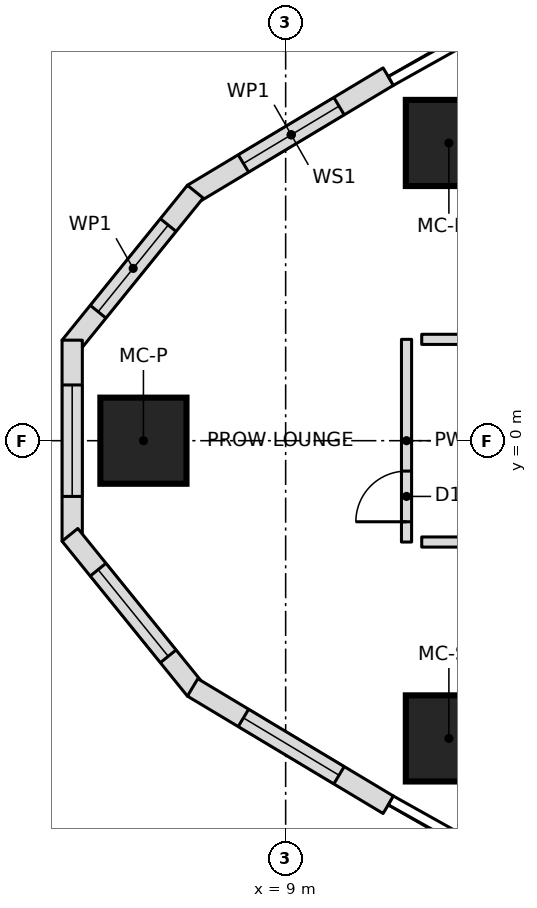
"""IFC4 building model, lengths in metres.
Left out: names, types, materials, properties, quantities, classifications, styles, units other than length and angle.
Written with IfcOpenShell. Run it as: python <this file> out.ifc"""

import sys

from ifc_helpers import new_model, si_unit, direction, frame, frame_2d, origin, origin_2d, place, context, subcontext, project, spatial, polyline, rectangle, outline, extrude, element, fill, save


model = new_model("IFC4")
c1 = context("Model", 3, precision=1e-05, world=origin(), true_north=direction((0.0, 1.0)))
c2 = subcontext(c1, "Body", "Model", "MODEL_VIEW")
j1 = project(units=[si_unit("LENGTHUNIT", "METRE"), si_unit("PLANEANGLEUNIT", "RADIAN")], contexts=[c1])
p1 = place(None, origin())
s1 = spatial("IfcSite", under=j1, at=p1, CompositionType="ELEMENT")
p2 = place(p1, origin())
s2 = spatial("IfcBuilding", under=s1, at=p2, CompositionType="ELEMENT")
p3 = place(p2, frame((0.0, 0.0, 116.85)))
s3 = spatial("IfcBuildingStorey", under=s2, at=p3, CompositionType="ELEMENT", Elevation=116.85)
for number, where, z_axis, x_axis in (
    (1, (6.193, 0.0, 0.0), (0.0, 0.0, 1.0), (1.0, 0.0, 0.0)),
    (2, (12.221, -5.876, 0.0), (0.0, 0.0, 1.0), (1.0, 0.0, 0.0)),
    (3, (12.221, 5.876, 0.0), (0.0, 0.0, 1.0), (1.0, 0.0, 0.0)),
):
    element("IfcColumn", number, at=place(p3, frame(where, z_axis=z_axis, x_axis=x_axis)), inside=s3, PredefinedType="COLUMN", context=c2, shape_type="SweptSolid", body=[
        extrude(rectangle(XDim=1.7, YDim=1.7, at=origin_2d()), origin(), (0.0, 0.0, 1.0), 3.55),
    ])
p4 = place(p3, frame((11.026, 7.186, 0.0), z_axis=(0.0, 0.0, 1.0), x_axis=(-0.857550776474, -0.514399325202, 0.0)))
e4 = element("IfcWall", 4, at=p4, inside=s3, PredefinedType="NOTDEFINED", context=c2, shape_type="SweptSolid", body=[
    extrude(outline(polyline([(0.0, -0.2), (4.503, -0.2), (4.433, 0.2), (0.0, 0.2), (0.0, -0.2)])), origin(), (0.0, 0.0, 1.0), 3.25),
])
p5 = place(p4, frame((1.134, 0.0, 0.6)))
e5 = element("IfcOpeningElement", 5, at=p5, cuts=e4, PredefinedType="OPENING", context=c2, shape_type="SweptSolid", body=[
    extrude(outline(polyline([(0.0, 1.35), (0.084, 1.771), (0.322, 2.128), (0.679, 2.366), (1.1, 2.45), (1.521, 2.366), (1.878, 2.128), (2.116, 1.771), (2.2, 1.35), (2.2, 1.1), (2.116, 0.679), (1.878, 0.322), (1.521, 0.084), (1.1, 0.0), (0.679, 0.084), (0.322, 0.322), (0.084, 0.679), (0.0, 1.1), (0.0, 1.35)])), frame((0.0, 0.21, 0.0), z_axis=(0.0, -1.0, 0.0), x_axis=(1.0, 0.0, 0.0)), (0.0, 0.0, 1.0), 0.42),
])
p6 = place(p3, frame((7.194, 4.888, 0.0), z_axis=(0.0, 0.0, 1.0), x_axis=(-0.62903486133, -0.777377092042, 0.0)))
e6 = element("IfcWall", 6, at=p6, inside=s3, PredefinedType="NOTDEFINED", context=c2, shape_type="SweptSolid", body=[
    extrude(outline(polyline([(-0.035, -0.2), (3.897, -0.2), (3.756, 0.2), (0.035, 0.2), (-0.035, -0.2)])), origin(), (0.0, 0.0, 1.0), 3.25),
])
p7 = place(p6, frame((0.813, 0.0, 0.6)))
e7 = element("IfcOpeningElement", 7, at=p7, cuts=e6, PredefinedType="OPENING", context=c2, shape_type="SweptSolid", body=[
    extrude(outline(polyline([(0.0, 1.35), (0.084, 1.771), (0.322, 2.128), (0.679, 2.366), (1.1, 2.45), (1.521, 2.366), (1.878, 2.128), (2.116, 1.771), (2.2, 1.35), (2.2, 1.1), (2.116, 0.679), (1.878, 0.322), (1.521, 0.084), (1.1, 0.0), (0.679, 0.084), (0.322, 0.322), (0.084, 0.679), (0.0, 1.1), (0.0, 1.35)])), frame((0.0, 0.21, 0.0), z_axis=(0.0, -1.0, 0.0), x_axis=(1.0, 0.0, 0.0)), (0.0, 0.0, 1.0), 0.42),
])
p8 = place(p3, frame((4.787, 1.913, 0.0), z_axis=(0.0, 0.0, 1.0), x_axis=(0.0, -1.0, 0.0)))
e8 = element("IfcWall", 8, at=p8, inside=s3, PredefinedType="NOTDEFINED", context=c2, shape_type="SweptSolid", body=[
    extrude(outline(polyline([(-0.071, -0.2), (3.897, -0.2), (3.755, 0.2), (0.071, 0.2), (-0.071, -0.2)])), origin(), (0.0, 0.0, 1.0), 3.25),
])
p9 = place(p8, frame((0.813, 0.0, 0.6)))
e9 = element("IfcOpeningElement", 9, at=p9, cuts=e8, PredefinedType="OPENING", context=c2, shape_type="SweptSolid", body=[
    extrude(outline(polyline([(0.0, 1.35), (0.084, 1.771), (0.322, 2.128), (0.679, 2.366), (1.1, 2.45), (1.521, 2.366), (1.878, 2.128), (2.116, 1.771), (2.2, 1.35), (2.2, 1.1), (2.116, 0.679), (1.878, 0.322), (1.521, 0.084), (1.1, 0.0), (0.679, 0.084), (0.322, 0.322), (0.084, 0.679), (0.0, 1.1), (0.0, 1.35)])), frame((0.0, 0.21, 0.0), z_axis=(0.0, -1.0, 0.0), x_axis=(1.0, 0.0, 0.0)), (0.0, 0.0, 1.0), 0.42),
])
p10 = place(p3, frame((4.787, -1.913, 0.0), z_axis=(0.0, 0.0, 1.0), x_axis=(0.62903486133, -0.777377092042, 0.0)))
e10 = element("IfcWall", 10, at=p10, inside=s3, PredefinedType="NOTDEFINED", context=c2, shape_type="SweptSolid", body=[
    extrude(outline(polyline([(-0.071, -0.2), (3.862, -0.2), (3.791, 0.2), (0.071, 0.2), (-0.071, -0.2)])), origin(), (0.0, 0.0, 1.0), 3.25),
])
p11 = place(p10, frame((0.813, 0.0, 0.6)))
e11 = element("IfcOpeningElement", 11, at=p11, cuts=e10, PredefinedType="OPENING", context=c2, shape_type="SweptSolid", body=[
    extrude(outline(polyline([(0.0, 1.35), (0.084, 1.771), (0.322, 2.128), (0.679, 2.366), (1.1, 2.45), (1.521, 2.366), (1.878, 2.128), (2.116, 1.771), (2.2, 1.35), (2.2, 1.1), (2.116, 0.679), (1.878, 0.322), (1.521, 0.084), (1.1, 0.0), (0.679, 0.084), (0.322, 0.322), (0.084, 0.679), (0.0, 1.1), (0.0, 1.35)])), frame((0.0, 0.21, 0.0), z_axis=(0.0, -1.0, 0.0), x_axis=(1.0, 0.0, 0.0)), (0.0, 0.0, 1.0), 0.42),
])
p12 = place(p3, frame((7.194, -4.888, 0.0), z_axis=(0.0, 0.0, 1.0), x_axis=(0.857550776474, -0.514399325202, 0.0)))
e12 = element("IfcWall", 12, at=p12, inside=s3, PredefinedType="NOTDEFINED", context=c2, shape_type="SweptSolid", body=[
    extrude(outline(polyline([(-0.035, -0.2), (4.468, -0.2), (4.468, 0.2), (0.035, 0.2), (-0.035, -0.2)])), origin(), (0.0, 0.0, 1.0), 3.25),
])
p13 = place(p12, frame((1.134, 0.0, 0.6)))
e13 = element("IfcOpeningElement", 13, at=p13, cuts=e12, PredefinedType="OPENING", context=c2, shape_type="SweptSolid", body=[
    extrude(outline(polyline([(0.0, 1.35), (0.084, 1.771), (0.322, 2.128), (0.679, 2.366), (1.1, 2.45), (1.521, 2.366), (1.878, 2.128), (2.116, 1.771), (2.2, 1.35), (2.2, 1.1), (2.116, 0.679), (1.878, 0.322), (1.521, 0.084), (1.1, 0.0), (0.679, 0.084), (0.322, 0.322), (0.084, 0.679), (0.0, 1.1), (0.0, 1.35)])), frame((0.0, 0.21, 0.0), z_axis=(0.0, -1.0, 0.0), x_axis=(1.0, 0.0, 0.0)), (0.0, 0.0, 1.0), 0.42),
])
p14 = place(p3, frame((11.685, 2.0, 0.0), z_axis=(0.0, 0.0, 1.0), x_axis=(1.0, 0.0, 0.0)))
e14 = element("IfcWall", 14, at=p14, inside=s3, PredefinedType="PARTITIONING", context=c2, shape_type="SweptSolid", body=[
    extrude(rectangle(XDim=3.168, YDim=0.2, at=frame_2d((1.584, 0.0))), origin(), (0.0, 0.0, 1.0), 3.15),
])
p15 = place(p14, frame((1.084, 0.0, 0.0)))
e15 = element("IfcOpeningElement", 15, at=p15, cuts=e14, PredefinedType="OPENING", context=c2, shape_type="SweptSolid", body=[
    extrude(rectangle(XDim=1.0, YDim=2.1, at=frame_2d((0.5, 1.05))), frame((0.0, 0.11, 0.0), z_axis=(0.0, -1.0, 0.0), x_axis=(1.0, 0.0, 0.0)), (0.0, 0.0, 1.0), 0.22),
])
p16 = place(p3, frame((11.685, -2.0, 0.0), z_axis=(0.0, 0.0, 1.0), x_axis=(1.0, 0.0, 0.0)))
e16 = element("IfcWall", 16, at=p16, inside=s3, PredefinedType="PARTITIONING", context=c2, shape_type="SweptSolid", body=[
    extrude(rectangle(XDim=3.168, YDim=0.2, at=frame_2d((1.584, 0.0))), origin(), (0.0, 0.0, 1.0), 3.15),
])
p17 = place(p16, frame((1.084, 0.0, 0.0)))
e17 = element("IfcOpeningElement", 17, at=p17, cuts=e16, PredefinedType="OPENING", context=c2, shape_type="SweptSolid", body=[
    extrude(rectangle(XDim=1.0, YDim=2.1, at=frame_2d((0.5, 1.05))), frame((0.0, 0.11, 0.0), z_axis=(0.0, -1.0, 0.0), x_axis=(1.0, 0.0, 0.0)), (0.0, 0.0, 1.0), 0.22),
])
p18 = place(p3, frame((11.385, -2.0, 0.0), z_axis=(0.0, 0.0, 1.0), x_axis=(0.0, 1.0, 0.0)))
e18 = element("IfcWall", 18, at=p18, inside=s3, PredefinedType="PARTITIONING", context=c2, shape_type="SweptSolid", body=[
    extrude(rectangle(XDim=4.0, YDim=0.2, at=frame_2d((2.0, 0.0))), origin(), (0.0, 0.0, 1.0), 3.15),
])
p19 = place(p18, frame((0.4, 0.0, 0.0)))
e19 = element("IfcOpeningElement", 19, at=p19, cuts=e18, PredefinedType="OPENING", context=c2, shape_type="SweptSolid", body=[
    extrude(rectangle(XDim=1.0, YDim=2.1, at=frame_2d((0.5, 1.05))), frame((0.0, 0.11, 0.0), z_axis=(0.0, -1.0, 0.0), x_axis=(1.0, 0.0, 0.0)), (0.0, 0.0, 1.0), 0.22),
])
p20 = place(p5, origin())
e20 = element("IfcWindow", 20, at=p20, inside=s3, PartitioningType="SINGLE_PANEL", PredefinedType="WINDOW", context=c2, shape_type="SweptSolid", body=[
    extrude(outline(polyline([(0.0, 1.35), (0.084, 1.771), (0.322, 2.128), (0.679, 2.366), (1.1, 2.45), (1.521, 2.366), (1.878, 2.128), (2.116, 1.771), (2.2, 1.35), (2.2, 1.1), (2.116, 0.679), (1.878, 0.322), (1.521, 0.084), (1.1, 0.0), (0.679, 0.084), (0.322, 0.322), (0.084, 0.679), (0.0, 1.1), (0.0, 1.35)])), frame((0.0, 0.17, 0.0), z_axis=(0.0, -1.0, 0.0), x_axis=(1.0, 0.0, 0.0)), (0.0, 0.0, 1.0), 0.06),
])
fill(e5, e20)
p21 = place(p7, origin())
e21 = element("IfcWindow", 21, at=p21, inside=s3, PartitioningType="SINGLE_PANEL", PredefinedType="WINDOW", context=c2, shape_type="SweptSolid", body=[
    extrude(outline(polyline([(0.0, 1.35), (0.084, 1.771), (0.322, 2.128), (0.679, 2.366), (1.1, 2.45), (1.521, 2.366), (1.878, 2.128), (2.116, 1.771), (2.2, 1.35), (2.2, 1.1), (2.116, 0.679), (1.878, 0.322), (1.521, 0.084), (1.1, 0.0), (0.679, 0.084), (0.322, 0.322), (0.084, 0.679), (0.0, 1.1), (0.0, 1.35)])), frame((0.0, 0.17, 0.0), z_axis=(0.0, -1.0, 0.0), x_axis=(1.0, 0.0, 0.0)), (0.0, 0.0, 1.0), 0.06),
])
fill(e7, e21)
p22 = place(p9, origin())
e22 = element("IfcWindow", 22, at=p22, inside=s3, PartitioningType="SINGLE_PANEL", PredefinedType="WINDOW", context=c2, shape_type="SweptSolid", body=[
    extrude(outline(polyline([(0.0, 1.35), (0.084, 1.771), (0.322, 2.128), (0.679, 2.366), (1.1, 2.45), (1.521, 2.366), (1.878, 2.128), (2.116, 1.771), (2.2, 1.35), (2.2, 1.1), (2.116, 0.679), (1.878, 0.322), (1.521, 0.084), (1.1, 0.0), (0.679, 0.084), (0.322, 0.322), (0.084, 0.679), (0.0, 1.1), (0.0, 1.35)])), frame((0.0, 0.17, 0.0), z_axis=(0.0, -1.0, 0.0), x_axis=(1.0, 0.0, 0.0)), (0.0, 0.0, 1.0), 0.06),
])
fill(e9, e22)
p23 = place(p11, origin())
e23 = element("IfcWindow", 23, at=p23, inside=s3, PartitioningType="SINGLE_PANEL", PredefinedType="WINDOW", context=c2, shape_type="SweptSolid", body=[
    extrude(outline(polyline([(0.0, 1.35), (0.084, 1.771), (0.322, 2.128), (0.679, 2.366), (1.1, 2.45), (1.521, 2.366), (1.878, 2.128), (2.116, 1.771), (2.2, 1.35), (2.2, 1.1), (2.116, 0.679), (1.878, 0.322), (1.521, 0.084), (1.1, 0.0), (0.679, 0.084), (0.322, 0.322), (0.084, 0.679), (0.0, 1.1), (0.0, 1.35)])), frame((0.0, 0.17, 0.0), z_axis=(0.0, -1.0, 0.0), x_axis=(1.0, 0.0, 0.0)), (0.0, 0.0, 1.0), 0.06),
])
fill(e11, e23)
p24 = place(p13, origin())
e24 = element("IfcWindow", 24, at=p24, inside=s3, PartitioningType="SINGLE_PANEL", PredefinedType="WINDOW", context=c2, shape_type="SweptSolid", body=[
    extrude(outline(polyline([(0.0, 1.35), (0.084, 1.771), (0.322, 2.128), (0.679, 2.366), (1.1, 2.45), (1.521, 2.366), (1.878, 2.128), (2.116, 1.771), (2.2, 1.35), (2.2, 1.1), (2.116, 0.679), (1.878, 0.322), (1.521, 0.084), (1.1, 0.0), (0.679, 0.084), (0.322, 0.322), (0.084, 0.679), (0.0, 1.1), (0.0, 1.35)])), frame((0.0, 0.17, 0.0), z_axis=(0.0, -1.0, 0.0), x_axis=(1.0, 0.0, 0.0)), (0.0, 0.0, 1.0), 0.06),
])
fill(e13, e24)
p25 = place(p19, origin())
e25 = element("IfcDoor", 25, at=p25, inside=s3, OperationType="SINGLE_SWING_LEFT", PredefinedType="DOOR", context=c2, shape_type="SweptSolid", body=[
    extrude(rectangle(XDim=1.0, YDim=2.1, at=frame_2d((0.5, 1.05))), frame((0.0, 0.025, 0.0), z_axis=(0.0, -1.0, 0.0), x_axis=(1.0, 0.0, 0.0)), (0.0, 0.0, 1.0), 0.05),
])
fill(e19, e25)
save(model, sys.argv[1])
